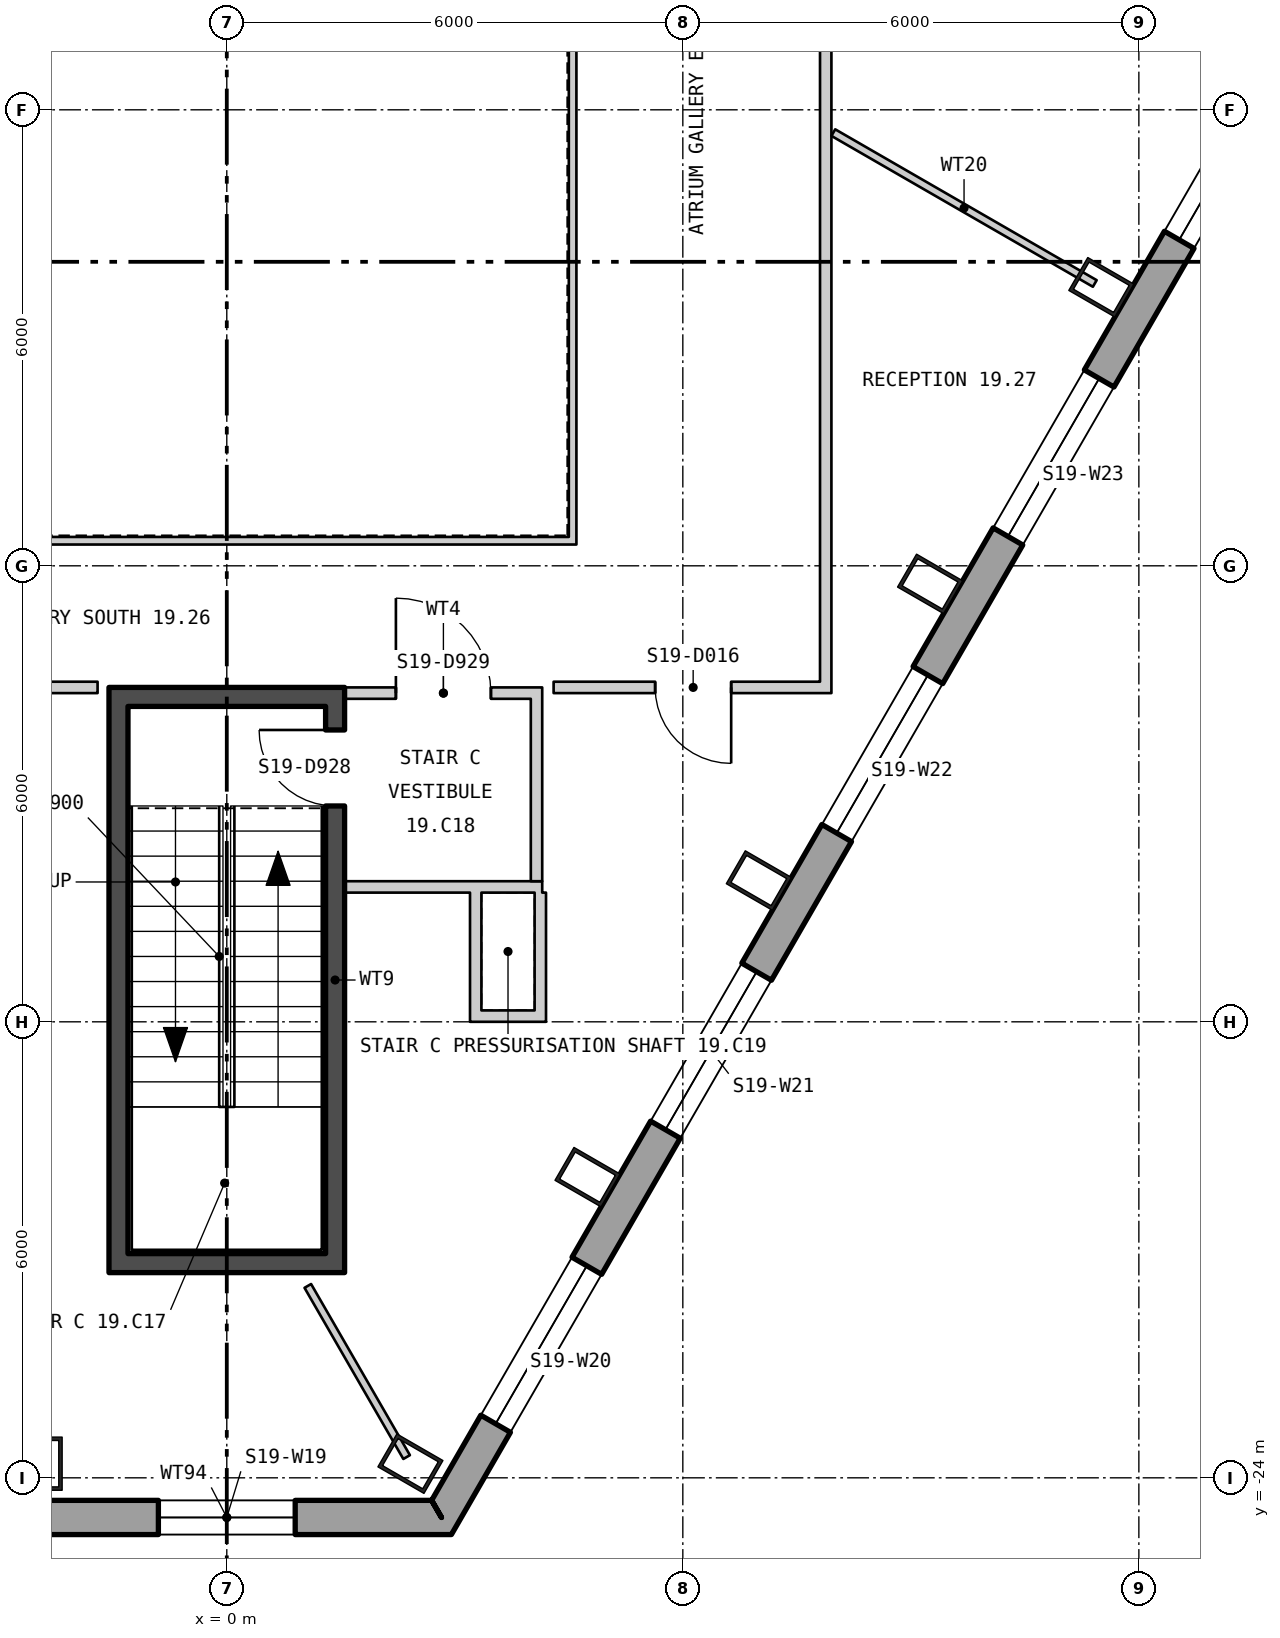
"""IFC4 building model, lengths in metres.
Left out: names, types, materials, properties, quantities, classifications, styles, units other than length and angle.
Written with IfcOpenShell. Run it as: python <this file> out.ifc"""

import sys

from ifc_helpers import new_model, si_unit, direction, frame, frame_2d, origin, origin_2d, place, context, subcontext, project, spatial, polyline, rectangle, hollow_rectangle, outline, extrude, element, fill, save


model = new_model("IFC4")
c1 = context("Model", 3, precision=1e-05, world=origin(), true_north=direction((0.0, 1.0)))
c2 = subcontext(c1, "Body", "Model", "MODEL_VIEW")
j1 = project(units=[si_unit("LENGTHUNIT", "METRE"), si_unit("PLANEANGLEUNIT", "RADIAN")], contexts=[c1])
p1 = place(None, origin())
s1 = spatial("IfcSite", under=j1, at=p1, CompositionType="ELEMENT")
p2 = place(p1, origin())
s2 = spatial("IfcBuilding", under=s1, at=p2, CompositionType="ELEMENT")
p3 = place(p2, frame((0.0, 0.0, 257.1)))
s3 = spatial("IfcBuildingStorey", under=s2, at=p3, CompositionType="ELEMENT", Elevation=257.1)
for number, where, z_axis, x_axis in (
    (1, (-2.416, -23.814, 0.0), (0.0, 0.0, 1.0), (1.0, 0.0, 0.0)),
    (2, (2.416, -23.814, 0.0), (0.0, 0.0, 1.0), (0.5, 0.866, 0.0)),
    (3, (4.746, -20.044, 0.0), (0.0, 0.0, 1.0), (0.5, 0.866, 0.0)),
    (4, (7.0, -16.141, 0.0), (0.0, 0.0, 1.0), (0.5, 0.866, 0.0)),
    (5, (9.253, -12.238, 0.0), (0.0, 0.0, 1.0), (0.5, 0.866, 0.0)),
    (6, (11.506, -8.335, 0.0), (0.0, 0.0, 1.0), (0.5, 0.866, 0.0)),
):
    element("IfcColumn", number, at=place(p3, frame(where, z_axis=z_axis, x_axis=x_axis)), inside=s3, PredefinedType="COLUMN", context=c2, shape_type="SweptSolid", body=[
        extrude(hollow_rectangle(XDim=0.5, YDim=0.7, WallThickness=0.045, at=origin_2d()), origin(), (0.0, 0.0, 1.0), 3.9),
    ])
p4 = place(p3, frame((-2.825, -24.522, -0.18), z_axis=(0.0, 0.0, 1.0), x_axis=(1.0, 0.0, 0.0)))
e7 = element("IfcWall", 7, at=p4, inside=s3, PredefinedType="SOLIDWALL", context=c2, shape_type="SweptSolid", body=[
    extrude(outline(polyline([(-0.13, -0.225), (5.78, -0.225), (5.52, 0.225), (0.13, 0.225), (-0.13, -0.225)])), origin(), (0.0, 0.0, 1.0), 3.68),
])
p5 = place(p4, frame((1.925, 0.0, 1.08)))
e8 = element("IfcOpeningElement", 8, at=p5, cuts=e7, PredefinedType="OPENING", context=c2, shape_type="SweptSolid", body=[
    extrude(rectangle(XDim=1.8, YDim=2.0, at=frame_2d((0.9, 1.0))), frame((0.0, 0.235, 0.0), z_axis=(0.0, -1.0, 0.0), x_axis=(1.0, 0.0, 0.0)), (0.0, 0.0, 1.0), 0.47),
])
p6 = place(p3, frame((2.825, -24.522, -0.18), z_axis=(0.0, 0.0, 1.0), x_axis=(0.500000141277, 0.866025322218, 0.0)))
e9 = element("IfcWall", 9, at=p6, inside=s3, PredefinedType="SOLIDWALL", context=c2, shape_type="SweptSolid", body=[
    extrude(outline(polyline([(-0.13, -0.225), (45.86, -0.225), (45.6, 0.225), (0.13, 0.225), (-0.13, -0.225)])), origin(), (0.0, 0.0, 1.0), 3.68),
])
p7 = place(p6, frame((1.424, 0.0, 1.08)))
e10 = element("IfcOpeningElement", 10, at=p7, cuts=e9, PredefinedType="OPENING", context=c2, shape_type="SweptSolid", body=[
    extrude(rectangle(XDim=2.4, YDim=2.0, at=frame_2d((1.2, 1.0))), frame((0.0, 0.235, 0.0), z_axis=(0.0, -1.0, 0.0), x_axis=(1.0, 0.0, 0.0)), (0.0, 0.0, 1.0), 0.47),
])
p8 = place(p6, frame((5.892, 0.0, 1.08)))
e11 = element("IfcOpeningElement", 11, at=p8, cuts=e9, PredefinedType="OPENING", context=c2, shape_type="SweptSolid", body=[
    extrude(rectangle(XDim=2.4, YDim=2.0, at=frame_2d((1.2, 1.0))), frame((0.0, 0.235, 0.0), z_axis=(0.0, -1.0, 0.0), x_axis=(1.0, 0.0, 0.0)), (0.0, 0.0, 1.0), 0.47),
])
p9 = place(p6, frame((10.399, 0.0, 1.08)))
e12 = element("IfcOpeningElement", 12, at=p9, cuts=e9, PredefinedType="OPENING", context=c2, shape_type="SweptSolid", body=[
    extrude(rectangle(XDim=2.4, YDim=2.0, at=frame_2d((1.2, 1.0))), frame((0.0, 0.235, 0.0), z_axis=(0.0, -1.0, 0.0), x_axis=(1.0, 0.0, 0.0)), (0.0, 0.0, 1.0), 0.47),
])
p10 = place(p6, frame((14.905, 0.0, 1.08)))
e13 = element("IfcOpeningElement", 13, at=p10, cuts=e9, PredefinedType="OPENING", context=c2, shape_type="SweptSolid", body=[
    extrude(rectangle(XDim=2.4, YDim=2.0, at=frame_2d((1.2, 1.0))), frame((0.0, 0.235, 0.0), z_axis=(0.0, -1.0, 0.0), x_axis=(1.0, 0.0, 0.0)), (0.0, 0.0, 1.0), 0.47),
])
p11 = place(p6, frame((19.412, 0.0, 1.08)))
e14 = element("IfcOpeningElement", 14, at=p11, cuts=e9, PredefinedType="OPENING", context=c2, shape_type="SweptSolid", body=[
    extrude(rectangle(XDim=2.4, YDim=2.0, at=frame_2d((1.2, 1.0))), frame((0.0, 0.235, 0.0), z_axis=(0.0, -1.0, 0.0), x_axis=(1.0, 0.0, 0.0)), (0.0, 0.0, 1.0), 0.47),
])
p12 = place(p6, frame((28.425, 0.0, 1.08)))
e15 = element("IfcOpeningElement", 15, at=p12, cuts=e9, PredefinedType="OPENING", context=c2, shape_type="SweptSolid", body=[
    extrude(rectangle(XDim=2.4, YDim=2.0, at=frame_2d((1.2, 1.0))), frame((0.0, 0.235, 0.0), z_axis=(0.0, -1.0, 0.0), x_axis=(1.0, 0.0, 0.0)), (0.0, 0.0, 1.0), 0.47),
])
p13 = place(p6, frame((37.438, 0.0, 1.08)))
e16 = element("IfcOpeningElement", 16, at=p13, cuts=e9, PredefinedType="OPENING", context=c2, shape_type="SweptSolid", body=[
    extrude(rectangle(XDim=2.4, YDim=2.0, at=frame_2d((1.2, 1.0))), frame((0.0, 0.235, 0.0), z_axis=(0.0, -1.0, 0.0), x_axis=(1.0, 0.0, 0.0)), (0.0, 0.0, 1.0), 0.47),
])
p14 = place(p6, frame((41.907, 0.0, 1.08)))
e17 = element("IfcOpeningElement", 17, at=p14, cuts=e9, PredefinedType="OPENING", context=c2, shape_type="SweptSolid", body=[
    extrude(rectangle(XDim=2.4, YDim=2.0, at=frame_2d((1.2, 1.0))), frame((0.0, 0.235, 0.0), z_axis=(0.0, -1.0, 0.0), x_axis=(1.0, 0.0, 0.0)), (0.0, 0.0, 1.0), 0.47),
])
p15 = place(p3, frame((-4.6, -11.67, 0.0), z_axis=(0.0, 0.0, 1.0), x_axis=(1.0, 0.0, 0.0)))
e18 = element("IfcWall", 18, at=p15, inside=s3, PredefinedType="PARTITIONING", context=c2, shape_type="SweptSolid", body=[
    extrude(rectangle(XDim=9.2, YDim=0.1, at=frame_2d((4.6, 0.0))), origin(), (0.0, 0.0, 1.0), 3.7),
])
p16 = place(p3, frame((4.55, -11.62, 0.0), z_axis=(0.0, 0.0, 1.0), x_axis=(0.0, 1.0, 0.0)))
e19 = element("IfcWall", 19, at=p16, inside=s3, PredefinedType="PARTITIONING", context=c2, shape_type="SweptSolid", body=[
    extrude(rectangle(XDim=8.04, YDim=0.1, at=frame_2d((4.02, 0.0))), origin(), (0.0, 0.0, 1.0), 3.7),
])
p17 = place(p3, frame((-1.425, -21.05, 0.0), z_axis=(0.0, 0.0, 1.0), x_axis=(0.0, 1.0, 0.0)))
e20 = element("IfcWall", 20, at=p17, inside=s3, PredefinedType="SHEAR", context=c2, shape_type="SweptSolid", body=[
    extrude(rectangle(XDim=7.2, YDim=0.25, at=frame_2d((3.6, 0.0))), origin(), (0.0, 0.0, 1.0), 3.7),
])
p18 = place(p3, frame((1.425, -21.05, 0.0), z_axis=(0.0, 0.0, 1.0), x_axis=(0.0, 1.0, 0.0)))
e21 = element("IfcWall", 21, at=p18, inside=s3, PredefinedType="SHEAR", context=c2, shape_type="SweptSolid", body=[
    extrude(rectangle(XDim=7.2, YDim=0.25, at=frame_2d((3.6, 0.0))), origin(), (0.0, 0.0, 1.0), 3.7),
])
p19 = place(p18, frame((5.89, 0.0, 0.0)))
e22 = element("IfcOpeningElement", 22, at=p19, cuts=e21, PredefinedType="OPENING", context=c2, shape_type="SweptSolid", body=[
    extrude(rectangle(XDim=1.0, YDim=2.1, at=frame_2d((0.5, 1.05))), frame((0.0, 0.135, 0.0), z_axis=(0.0, -1.0, 0.0), x_axis=(1.0, 0.0, 0.0)), (0.0, 0.0, 1.0), 0.27),
])
for number, where, z_axis, x_axis in (
    (23, (-1.55, -21.175, 0.0), (0.0, 0.0, 1.0), (1.0, 0.0, 0.0)),
    (24, (-1.55, -13.725, 0.0), (0.0, 0.0, 1.0), (1.0, 0.0, 0.0)),
):
    element("IfcWall", number, at=place(p3, frame(where, z_axis=z_axis, x_axis=x_axis)), inside=s3, PredefinedType="SHEAR", context=c2, shape_type="SweptSolid", body=[
        extrude(rectangle(XDim=3.1, YDim=0.25, at=frame_2d((1.55, 0.0))), origin(), (0.0, 0.0, 1.0), 3.7),
    ])
p20 = place(p3, frame((1.55, -16.225, 0.0), z_axis=(0.0, 0.0, 1.0), x_axis=(1.0, 0.0, 0.0)))
e25 = element("IfcWall", 25, at=p20, inside=s3, PredefinedType="PARTITIONING", context=c2, shape_type="SweptSolid", body=[
    extrude(rectangle(XDim=2.6, YDim=0.15, at=frame_2d((1.3, 0.0))), origin(), (0.0, 0.0, 1.0), 3.7),
])
p21 = place(p3, frame((4.075, -16.15, 0.0), z_axis=(0.0, 0.0, 1.0), x_axis=(0.0, 1.0, 0.0)))
e26 = element("IfcWall", 26, at=p21, inside=s3, PredefinedType="PARTITIONING", context=c2, shape_type="SweptSolid", body=[
    extrude(rectangle(XDim=2.4, YDim=0.15, at=frame_2d((1.2, 0.0))), origin(), (0.0, 0.0, 1.0), 3.7),
])
p22 = place(p3, frame((1.55, -13.675, 0.0), z_axis=(0.0, 0.0, 1.0), x_axis=(1.0, 0.0, 0.0)))
e27 = element("IfcWall", 27, at=p22, inside=s3, PredefinedType="PARTITIONING", context=c2, shape_type="SweptSolid", body=[
    extrude(rectangle(XDim=2.6, YDim=0.15, at=frame_2d((1.3, 0.0))), origin(), (0.0, 0.0, 1.0), 2.692),
])
p23 = place(p22, frame((0.675, 0.0, 0.0)))
e28 = element("IfcOpeningElement", 28, at=p23, cuts=e27, PredefinedType="OPENING", context=c2, shape_type="SweptSolid", body=[
    extrude(rectangle(XDim=1.25, YDim=2.1, at=frame_2d((0.625, 1.05))), frame((0.0, 0.085, 0.0), z_axis=(0.0, -1.0, 0.0), x_axis=(1.0, 0.0, 0.0)), (0.0, 0.0, 1.0), 0.17),
])
p24 = place(p3, frame((3.275, -18.0, 0.0), z_axis=(0.0, 0.0, 1.0), x_axis=(0.0, 1.0, 0.0)))
e29 = element("IfcWall", 29, at=p24, inside=s3, PredefinedType="PARTITIONING", context=c2, shape_type="SweptSolid", body=[
    extrude(rectangle(XDim=1.7, YDim=0.15, at=frame_2d((0.85, 0.0))), origin(), (0.0, 0.0, 1.0), 3.2),
])
p25 = place(p3, frame((3.35, -17.925, 0.0), z_axis=(0.0, 0.0, 1.0), x_axis=(1.0, 0.0, 0.0)))
e30 = element("IfcWall", 30, at=p25, inside=s3, PredefinedType="PARTITIONING", context=c2, shape_type="SweptSolid", body=[
    extrude(rectangle(XDim=0.7, YDim=0.15, at=frame_2d((0.35, 0.0))), origin(), (0.0, 0.0, 1.0), 3.7),
])
p26 = place(p3, frame((4.125, -18.0, 0.0), z_axis=(0.0, 0.0, 1.0), x_axis=(0.0, 1.0, 0.0)))
e31 = element("IfcWall", 31, at=p26, inside=s3, PredefinedType="PARTITIONING", context=c2, shape_type="SweptSolid", body=[
    extrude(rectangle(XDim=1.7, YDim=0.15, at=frame_2d((0.85, 0.0))), origin(), (0.0, 0.0, 1.0), 3.7),
])
p27 = place(p3, frame((-7.805, -13.6, 0.0), z_axis=(0.0, 0.0, 1.0), x_axis=(1.0, 0.0, 0.0)))
e32 = element("IfcWall", 32, at=p27, inside=s3, PredefinedType="PARTITIONING", context=c2, shape_type="SweptSolid", body=[
    extrude(rectangle(XDim=6.105, YDim=0.15, at=frame_2d((3.053, 0.0))), origin(), (0.0, 0.0, 1.0), 2.692),
])
p28 = place(p27, frame((1.118, 0.0, 0.0)))
e33 = element("IfcOpeningElement", 33, at=p28, cuts=e32, PredefinedType="OPENING", context=c2, shape_type="SweptSolid", body=[
    extrude(rectangle(XDim=1.0, YDim=2.1, at=frame_2d((0.5, 1.05))), frame((0.0, 0.085, 0.0), z_axis=(0.0, -1.0, 0.0), x_axis=(1.0, 0.0, 0.0)), (0.0, 0.0, 1.0), 0.17),
])
p29 = place(p3, frame((1.066, -21.475, 0.0), z_axis=(0.0, 0.0, 1.0), x_axis=(0.499944387978, -0.86605750902, 0.0)))
e34 = element("IfcWall", 34, at=p29, inside=s3, PredefinedType="PARTITIONING", context=c2, shape_type="SweptSolid", body=[
    extrude(rectangle(XDim=2.6, YDim=0.1, at=frame_2d((1.3, 0.0))), origin(), (0.0, 0.0, 1.0), 3.7),
])
p30 = place(p3, frame((4.3, -13.6, 0.0), z_axis=(0.0, 0.0, 1.0), x_axis=(1.0, 0.0, 0.0)))
e35 = element("IfcWall", 35, at=p30, inside=s3, PredefinedType="PARTITIONING", context=c2, shape_type="SweptSolid", body=[
    extrude(rectangle(XDim=3.505, YDim=0.15, at=frame_2d((1.752, 0.0))), origin(), (0.0, 0.0, 1.0), 2.692),
])
p31 = place(p30, frame((1.336, 0.0, 0.0)))
e36 = element("IfcOpeningElement", 36, at=p31, cuts=e35, PredefinedType="OPENING", context=c2, shape_type="SweptSolid", body=[
    extrude(rectangle(XDim=1.0, YDim=2.1, at=frame_2d((0.5, 1.05))), frame((0.0, 0.085, 0.0), z_axis=(0.0, -1.0, 0.0), x_axis=(1.0, 0.0, 0.0)), (0.0, 0.0, 1.0), 0.17),
])
p32 = place(p3, frame((7.88, -13.675, 0.0), z_axis=(0.0, 0.0, 1.0), x_axis=(0.0, 1.0, 0.0)))
e37 = element("IfcWall", 37, at=p32, inside=s3, PredefinedType="PARTITIONING", context=c2, shape_type="SweptSolid", body=[
    extrude(rectangle(XDim=17.675, YDim=0.15, at=frame_2d((8.838, 0.0))), origin(), (0.0, 0.0, 1.0), 3.7),
])
p33 = place(p32, frame((12.984, 0.0, 0.0)))
e38 = element("IfcOpeningElement", 38, at=p33, cuts=e37, PredefinedType="OPENING", context=c2, shape_type="SweptSolid", body=[
    extrude(rectangle(XDim=1.0, YDim=2.1, at=frame_2d((0.5, 1.05))), frame((0.0, 0.085, 0.0), z_axis=(0.0, -1.0, 0.0), x_axis=(1.0, 0.0, 0.0)), (0.0, 0.0, 1.0), 0.17),
])
p34 = place(p32, frame((16.275, 0.0, 0.0)))
e39 = element("IfcOpeningElement", 39, at=p34, cuts=e37, PredefinedType="OPENING", context=c2, shape_type="SweptSolid", body=[
    extrude(rectangle(XDim=1.0, YDim=2.1, at=frame_2d((0.5, 1.05))), frame((0.0, 0.085, 0.0), z_axis=(0.0, -1.0, 0.0), x_axis=(1.0, 0.0, 0.0)), (0.0, 0.0, 1.0), 0.17),
])
p35 = place(p3, frame((7.98, -6.3, 0.0), z_axis=(0.0, 0.0, 1.0), x_axis=(0.866143665252, -0.499795109164, 0.0)))
e40 = element("IfcWall", 40, at=p35, inside=s3, PredefinedType="PARTITIONING", context=c2, shape_type="SweptSolid", body=[
    extrude(rectangle(XDim=3.972, YDim=0.1, at=frame_2d((1.986, 0.0))), origin(), (0.0, 0.0, 1.0), 3.7),
])
p36 = place(p5, origin())
e41 = element("IfcWindow", 41, at=p36, inside=s3, PartitioningType="SINGLE_PANEL", PredefinedType="WINDOW", context=c2, shape_type="SweptSolid", body=[
    extrude(rectangle(XDim=1.8, YDim=2.0, at=frame_2d((0.9, 1.0))), frame((0.0, 0.105, 0.0), z_axis=(0.0, -1.0, 0.0), x_axis=(1.0, 0.0, 0.0)), (0.0, 0.0, 1.0), 0.06),
])
fill(e8, e41)
p37 = place(p7, origin())
e42 = element("IfcWindow", 42, at=p37, inside=s3, PartitioningType="SINGLE_PANEL", PredefinedType="WINDOW", context=c2, shape_type="SweptSolid", body=[
    extrude(rectangle(XDim=2.4, YDim=2.0, at=frame_2d((1.2, 1.0))), frame((0.0, 0.105, 0.0), z_axis=(0.0, -1.0, 0.0), x_axis=(1.0, 0.0, 0.0)), (0.0, 0.0, 1.0), 0.06),
])
fill(e10, e42)
p38 = place(p8, origin())
e43 = element("IfcWindow", 43, at=p38, inside=s3, PartitioningType="SINGLE_PANEL", PredefinedType="WINDOW", context=c2, shape_type="SweptSolid", body=[
    extrude(rectangle(XDim=2.4, YDim=2.0, at=frame_2d((1.2, 1.0))), frame((0.0, 0.105, 0.0), z_axis=(0.0, -1.0, 0.0), x_axis=(1.0, 0.0, 0.0)), (0.0, 0.0, 1.0), 0.06),
])
fill(e11, e43)
p39 = place(p9, origin())
e44 = element("IfcWindow", 44, at=p39, inside=s3, PartitioningType="SINGLE_PANEL", PredefinedType="WINDOW", context=c2, shape_type="SweptSolid", body=[
    extrude(rectangle(XDim=2.4, YDim=2.0, at=frame_2d((1.2, 1.0))), frame((0.0, 0.105, 0.0), z_axis=(0.0, -1.0, 0.0), x_axis=(1.0, 0.0, 0.0)), (0.0, 0.0, 1.0), 0.06),
])
fill(e12, e44)
p40 = place(p10, origin())
e45 = element("IfcWindow", 45, at=p40, inside=s3, PartitioningType="SINGLE_PANEL", PredefinedType="WINDOW", context=c2, shape_type="SweptSolid", body=[
    extrude(rectangle(XDim=2.4, YDim=2.0, at=frame_2d((1.2, 1.0))), frame((0.0, 0.105, 0.0), z_axis=(0.0, -1.0, 0.0), x_axis=(1.0, 0.0, 0.0)), (0.0, 0.0, 1.0), 0.06),
])
fill(e13, e45)
p41 = place(p11, origin())
e46 = element("IfcWindow", 46, at=p41, inside=s3, PartitioningType="SINGLE_PANEL", PredefinedType="WINDOW", context=c2, shape_type="SweptSolid", body=[
    extrude(rectangle(XDim=2.4, YDim=2.0, at=frame_2d((1.2, 1.0))), frame((0.0, 0.105, 0.0), z_axis=(0.0, -1.0, 0.0), x_axis=(1.0, 0.0, 0.0)), (0.0, 0.0, 1.0), 0.06),
])
fill(e14, e46)
p42 = place(p19, origin())
e47 = element("IfcDoor", 47, at=p42, inside=s3, OperationType="SINGLE_SWING_LEFT", PredefinedType="DOOR", context=c2, shape_type="SweptSolid", body=[
    extrude(rectangle(XDim=1.0, YDim=2.1, at=frame_2d((0.5, 1.05))), frame((0.0, 0.025, 0.0), z_axis=(0.0, -1.0, 0.0), x_axis=(1.0, 0.0, 0.0)), (0.0, 0.0, 1.0), 0.05),
])
fill(e22, e47)
p43 = place(p23, origin())
e48 = element("IfcDoor", 48, at=p43, inside=s3, OperationType="SINGLE_SWING_RIGHT", PredefinedType="DOOR", context=c2, shape_type="SweptSolid", body=[
    extrude(rectangle(XDim=1.25, YDim=2.1, at=frame_2d((0.625, 1.05))), frame((0.0, 0.025, 0.0), z_axis=(0.0, -1.0, 0.0), x_axis=(1.0, 0.0, 0.0)), (0.0, 0.0, 1.0), 0.05),
])
fill(e28, e48)
p44 = place(p31, origin())
e49 = element("IfcDoor", 49, at=p44, inside=s3, OperationType="SINGLE_SWING_RIGHT", PredefinedType="DOOR", context=c2, shape_type="SweptSolid", body=[
    extrude(rectangle(XDim=1.0, YDim=2.1, at=frame_2d((0.5, 1.05))), frame((0.0, 0.025, 0.0), z_axis=(0.0, -1.0, 0.0), x_axis=(1.0, 0.0, 0.0)), (0.0, 0.0, 1.0), 0.05),
])
fill(e36, e49)
save(model, sys.argv[1])
